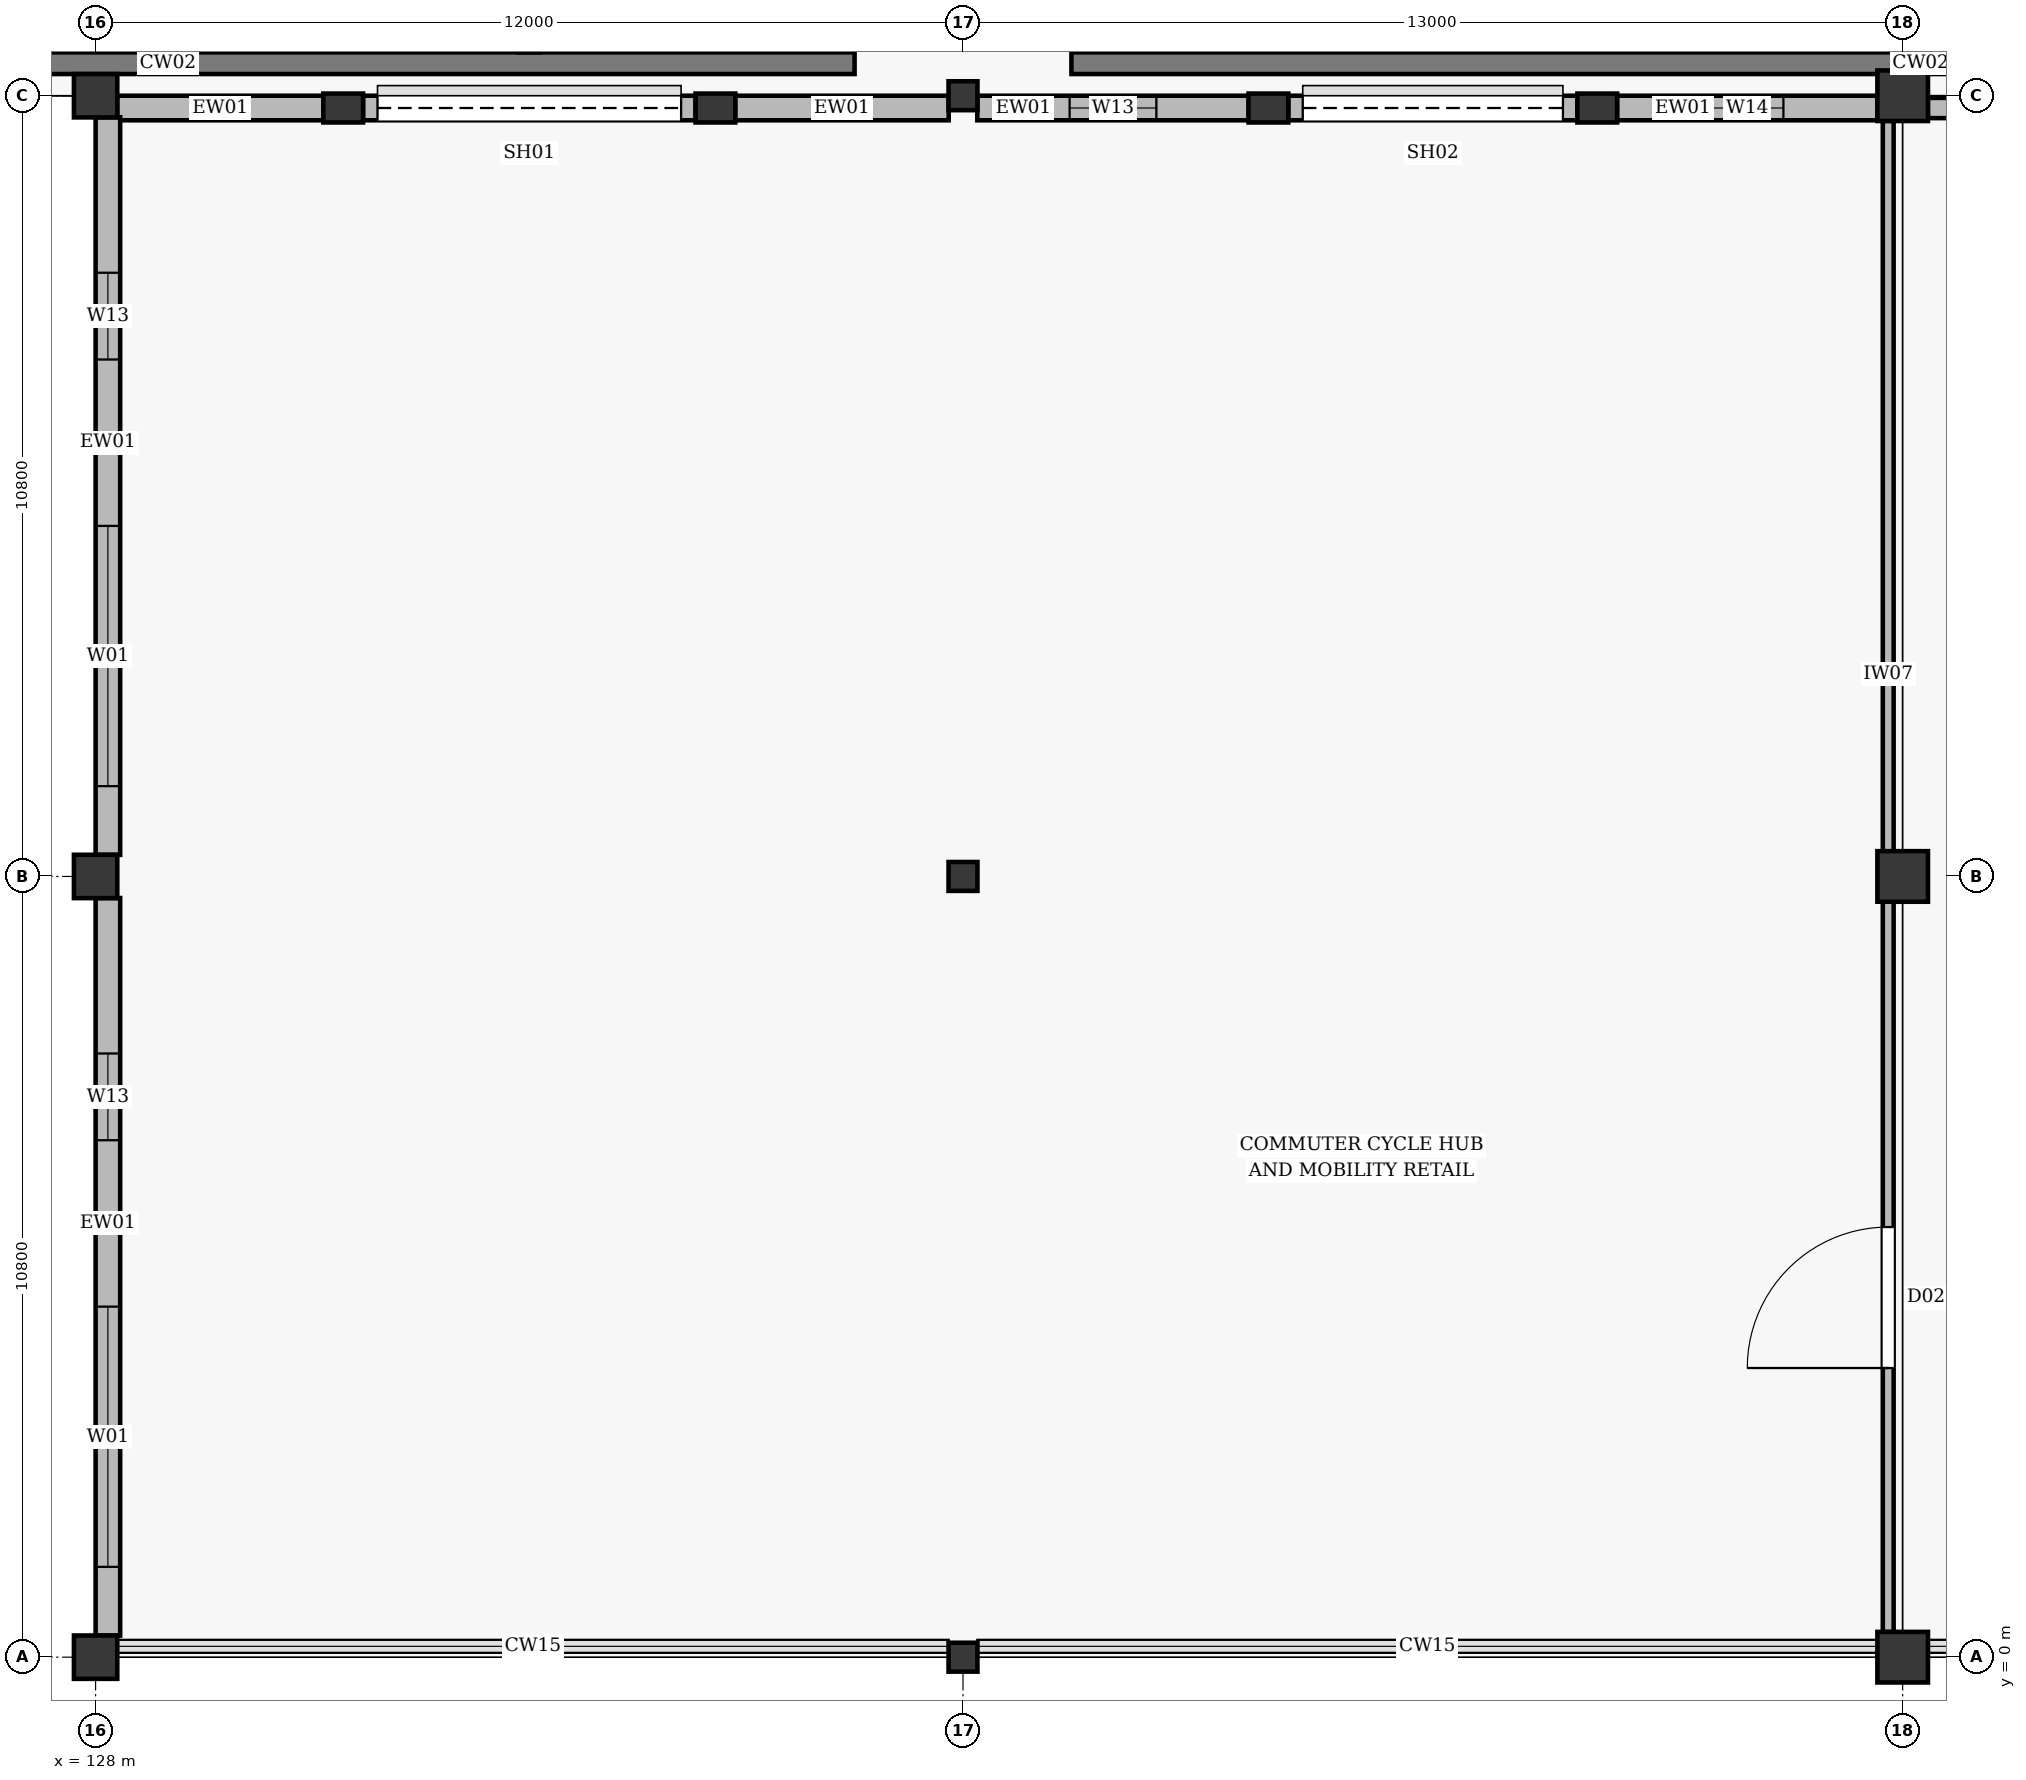
"""IFC4 building model, lengths in metres.
Left out: names, types, materials, properties, quantities, classifications, styles, units other than length and angle.
Written with IfcOpenShell. Run it as: python <this file> out.ifc"""

import sys

from ifc_helpers import new_model, si_unit, direction, frame, frame_2d, origin, origin_2d, place, context, subcontext, project, spatial, rectangle, hollow_rectangle, extrude, element, fill, save


model = new_model("IFC4")
c1 = context("Model", 3, precision=1e-05, world=origin(), true_north=direction((0.0, 1.0)))
c2 = subcontext(c1, "Body", "Model", "MODEL_VIEW")
j1 = project(units=[si_unit("LENGTHUNIT", "METRE"), si_unit("PLANEANGLEUNIT", "RADIAN")], contexts=[c1])
p1 = place(None, origin())
s1 = spatial("IfcSite", under=j1, at=p1, CompositionType="ELEMENT")
p2 = place(p1, origin())
s2 = spatial("IfcBuilding", under=s1, at=p2, CompositionType="ELEMENT")
p3 = place(p2, origin())
s3 = spatial("IfcBuildingStorey", under=s2, at=p3, CompositionType="ELEMENT", Elevation=0.0)
for number, where, z_axis, x_axis in (
    (1, (128.0, 0.0, 0.0), (0.0, 0.0, 1.0), (1.0, 0.0, 0.0)),
    (2, (128.0, 10.8, 0.0), (0.0, 0.0, 1.0), (1.0, 0.0, 0.0)),
    (3, (128.0, 21.6, 0.0), (0.0, 0.0, 1.0), (1.0, 0.0, 0.0)),
):
    element("IfcColumn", number, at=place(p3, frame(where, z_axis=z_axis, x_axis=x_axis)), inside=s3, PredefinedType="COLUMN", context=c2, shape_type="SweptSolid", body=[
        extrude(rectangle(XDim=0.6, YDim=0.6, at=origin_2d()), origin(), (0.0, 0.0, 1.0), 6.6),
    ])
for number, where, z_axis, x_axis in (
    (4, (140.0, 0.0, 0.0), (0.0, 0.0, 1.0), (1.0, 0.0, 0.0)),
    (5, (140.0, 10.8, 0.0), (0.0, 0.0, 1.0), (1.0, 0.0, 0.0)),
    (6, (140.0, 21.6, 0.0), (0.0, 0.0, 1.0), (1.0, 0.0, 0.0)),
):
    element("IfcColumn", number, at=place(p3, frame(where, z_axis=z_axis, x_axis=x_axis)), inside=s3, PredefinedType="COLUMN", context=c2, shape_type="SweptSolid", body=[
        extrude(hollow_rectangle(XDim=0.4, YDim=0.4, WallThickness=0.016, at=origin_2d()), origin(), (0.0, 0.0, 1.0), 6.6),
    ])
for number, where, z_axis, x_axis in (
    (7, (153.0, 0.0, 0.0), (0.0, 0.0, 1.0), (1.0, 0.0, 0.0)),
    (8, (153.0, 10.8, 0.0), (0.0, 0.0, 1.0), (1.0, 0.0, 0.0)),
    (9, (153.0, 21.6, 0.0), (0.0, 0.0, 1.0), (1.0, 0.0, 0.0)),
):
    element("IfcColumn", number, at=place(p3, frame(where, z_axis=z_axis, x_axis=x_axis)), inside=s3, PredefinedType="COLUMN", context=c2, shape_type="SweptSolid", body=[
        extrude(rectangle(XDim=0.7, YDim=0.7, at=origin_2d()), origin(), (0.0, 0.0, 1.0), 6.6),
    ])
p4 = place(p3, frame((119.5, 22.05, 0.0), z_axis=(0.0, 0.0, 1.0), x_axis=(1.0, 0.0, 0.0)))
e10 = element("IfcWall", 10, at=p4, inside=s3, PredefinedType="SOLIDWALL", context=c2, shape_type="SweptSolid", body=[
    extrude(rectangle(XDim=19.0, YDim=0.3, at=frame_2d((9.5, 0.0))), origin(), (0.0, 0.0, 1.0), 0.375),
])
p5 = place(p3, frame((141.5, 22.05, 0.0), z_axis=(0.0, 0.0, 1.0), x_axis=(1.0, 0.0, 0.0)))
e11 = element("IfcWall", 11, at=p5, inside=s3, PredefinedType="SOLIDWALL", context=c2, shape_type="SweptSolid", body=[
    extrude(rectangle(XDim=23.5, YDim=0.3, at=frame_2d((11.75, 0.0))), origin(), (0.0, 0.0, 1.0), 0.375),
])
p6 = place(p3, frame((134.0, 22.2, 0.0), z_axis=(0.0, 0.0, 1.0), x_axis=(0.0, 1.0, 0.0)))
e12 = element("IfcWall", 12, at=p6, inside=s3, PredefinedType="SOLIDWALL", context=c2, shape_type="SweptSolid", body=[
    extrude(rectangle(XDim=4.8, YDim=0.3, at=frame_2d((2.4, 0.0))), origin(), (0.0, 0.0, 1.0), 0.375),
])
for number, where, z_axis, x_axis in (
    (13, (131.425, 21.43, 0.0), (0.0, 0.0, 1.0), (1.0, 0.0, 0.0)),
    (14, (136.575, 21.43, 0.0), (0.0, 0.0, 1.0), (1.0, 0.0, 0.0)),
):
    element("IfcColumn", number, at=place(p3, frame(where, z_axis=z_axis, x_axis=x_axis)), inside=s3, PredefinedType="PILASTER", context=c2, shape_type="SweptSolid", body=[
        extrude(rectangle(XDim=0.55, YDim=0.4, at=origin_2d()), origin(), (0.0, 0.0, 1.0), 4.3),
    ])
p7 = place(p3, frame((128.298, 21.43, 0.0), z_axis=(0.0, 0.0, 1.0), x_axis=(1.0, 0.0, 0.0)))
e15 = element("IfcWall", 15, at=p7, inside=s3, PredefinedType="STANDARD", context=c2, shape_type="SweptSolid", body=[
    extrude(rectangle(XDim=2.854, YDim=0.34, at=frame_2d((1.427, 0.0))), origin(), (0.0, 0.0, 1.0), 4.28),
])
p8 = place(p3, frame((136.848, 21.43, 0.0), z_axis=(0.0, 0.0, 1.0), x_axis=(1.0, 0.0, 0.0)))
e16 = element("IfcWall", 16, at=p8, inside=s3, PredefinedType="STANDARD", context=c2, shape_type="SweptSolid", body=[
    extrude(rectangle(XDim=2.954, YDim=0.34, at=frame_2d((1.477, 0.0))), origin(), (0.0, 0.0, 1.0), 4.28),
])
p9 = place(p3, frame((131.7, 21.43, 0.0), z_axis=(0.0, 0.0, 1.0), x_axis=(1.0, 0.0, 0.0)))
e17 = element("IfcWall", 17, at=p9, inside=s3, PredefinedType="STANDARD", context=c2, shape_type="SweptSolid", body=[
    extrude(rectangle(XDim=4.6, YDim=0.34, at=frame_2d((2.3, 0.0))), origin(), (0.0, 0.0, 1.0), 4.26),
])
p10 = place(p9, frame((0.2, 0.0, 0.005)))
e18 = element("IfcOpeningElement", 18, at=p10, cuts=e17, PredefinedType="OPENING", context=c2, shape_type="SweptSolid", body=[
    extrude(rectangle(XDim=4.2, YDim=3.6, at=frame_2d((2.1, 1.8))), frame((0.0, 0.182, 0.0), z_axis=(0.0, -1.0, 0.0), x_axis=(1.0, 0.0, 0.0)), (0.0, 0.0, 1.0), 0.364),
])
for number, where, z_axis, x_axis in (
    (19, (144.225, 21.43, 0.0), (0.0, 0.0, 1.0), (1.0, 0.0, 0.0)),
    (20, (148.775, 21.43, 0.0), (0.0, 0.0, 1.0), (1.0, 0.0, 0.0)),
):
    element("IfcColumn", number, at=place(p3, frame(where, z_axis=z_axis, x_axis=x_axis)), inside=s3, PredefinedType="PILASTER", context=c2, shape_type="SweptSolid", body=[
        extrude(rectangle(XDim=0.55, YDim=0.4, at=origin_2d()), origin(), (0.0, 0.0, 1.0), 4.3),
    ])
p11 = place(p3, frame((140.198, 21.43, 0.0), z_axis=(0.0, 0.0, 1.0), x_axis=(1.0, 0.0, 0.0)))
e21 = element("IfcWall", 21, at=p11, inside=s3, PredefinedType="STANDARD", context=c2, shape_type="SweptSolid", body=[
    extrude(rectangle(XDim=3.754, YDim=0.34, at=frame_2d((1.877, 0.0))), origin(), (0.0, 0.0, 1.0), 4.28),
])
p12 = place(p11, frame((1.277, 0.0, 1.05)))
e22 = element("IfcOpeningElement", 22, at=p12, cuts=e21, PredefinedType="OPENING", context=c2, shape_type="SweptSolid", body=[
    extrude(rectangle(XDim=1.2, YDim=1.8, at=frame_2d((0.6, 0.9))), frame((0.0, 0.182, 0.0), z_axis=(0.0, -1.0, 0.0), x_axis=(1.0, 0.0, 0.0)), (0.0, 0.0, 1.0), 0.364),
])
p13 = place(p3, frame((149.048, 21.43, 0.0), z_axis=(0.0, 0.0, 1.0), x_axis=(1.0, 0.0, 0.0)))
e23 = element("IfcWall", 23, at=p13, inside=s3, PredefinedType="STANDARD", context=c2, shape_type="SweptSolid", body=[
    extrude(rectangle(XDim=3.604, YDim=0.34, at=frame_2d((1.802, 0.0))), origin(), (0.0, 0.0, 1.0), 4.28),
])
p14 = place(p13, frame((1.302, 0.0, 1.05)))
e24 = element("IfcOpeningElement", 24, at=p14, cuts=e23, PredefinedType="OPENING", context=c2, shape_type="SweptSolid", body=[
    extrude(rectangle(XDim=1.0, YDim=1.6, at=frame_2d((0.5, 0.8))), frame((0.0, 0.182, 0.0), z_axis=(0.0, -1.0, 0.0), x_axis=(1.0, 0.0, 0.0)), (0.0, 0.0, 1.0), 0.364),
])
p15 = place(p3, frame((144.5, 21.43, 0.0), z_axis=(0.0, 0.0, 1.0), x_axis=(1.0, 0.0, 0.0)))
e25 = element("IfcWall", 25, at=p15, inside=s3, PredefinedType="STANDARD", context=c2, shape_type="SweptSolid", body=[
    extrude(rectangle(XDim=4.0, YDim=0.34, at=frame_2d((2.0, 0.0))), origin(), (0.0, 0.0, 1.0), 4.26),
])
p16 = place(p15, frame((0.2, 0.0, 0.005)))
e26 = element("IfcOpeningElement", 26, at=p16, cuts=e25, PredefinedType="OPENING", context=c2, shape_type="SweptSolid", body=[
    extrude(rectangle(XDim=3.6, YDim=3.2, at=frame_2d((1.8, 1.6))), frame((0.0, 0.182, 0.0), z_axis=(0.0, -1.0, 0.0), x_axis=(1.0, 0.0, 0.0)), (0.0, 0.0, 1.0), 0.364),
])
p17 = place(p3, frame((153.348, 21.43, 0.0), z_axis=(0.0, 0.0, 1.0), x_axis=(1.0, 0.0, 0.0)))
e27 = element("IfcWall", 27, at=p17, inside=s3, PredefinedType="STANDARD", context=c2, shape_type="SweptSolid", body=[
    extrude(rectangle(XDim=12.804, YDim=0.28, at=frame_2d((6.402, 0.0))), origin(), (0.0, 0.0, 1.0), 5.69),
])
p18 = place(p17, frame((0.801, 0.0, 0.75)))
e28 = element("IfcOpeningElement", 28, at=p18, cuts=e27, PredefinedType="OPENING", context=c2, shape_type="SweptSolid", body=[
    extrude(rectangle(XDim=3.2, YDim=2.8, at=frame_2d((1.6, 1.4))), frame((0.0, 0.152, 0.0), z_axis=(0.0, -1.0, 0.0), x_axis=(1.0, 0.0, 0.0)), (0.0, 0.0, 1.0), 0.304),
])
p19 = place(p17, frame((5.402, 0.0, 0.75)))
e29 = element("IfcOpeningElement", 29, at=p19, cuts=e27, PredefinedType="OPENING", context=c2, shape_type="SweptSolid", body=[
    extrude(rectangle(XDim=2.0, YDim=2.2, at=frame_2d((1.0, 1.1))), frame((0.0, 0.152, 0.0), z_axis=(0.0, -1.0, 0.0), x_axis=(1.0, 0.0, 0.0)), (0.0, 0.0, 1.0), 0.304),
])
p20 = place(p17, frame((8.803, 0.0, 0.75)))
e30 = element("IfcOpeningElement", 30, at=p20, cuts=e27, PredefinedType="OPENING", context=c2, shape_type="SweptSolid", body=[
    extrude(rectangle(XDim=3.2, YDim=2.8, at=frame_2d((1.6, 1.4))), frame((0.0, 0.152, 0.0), z_axis=(0.0, -1.0, 0.0), x_axis=(1.0, 0.0, 0.0)), (0.0, 0.0, 1.0), 0.304),
])
p21 = place(p3, frame((128.17, 0.298, 0.0), z_axis=(0.0, 0.0, 1.0), x_axis=(0.0, 1.0, 0.0)))
e31 = element("IfcWall", 31, at=p21, inside=s3, PredefinedType="STANDARD", context=c2, shape_type="SweptSolid", body=[
    extrude(rectangle(XDim=10.204, YDim=0.34, at=frame_2d((5.102, 0.0))), origin(), (0.0, 0.0, 1.0), 5.75),
])
p22 = place(p21, frame((0.951, 0.0, 0.75)))
e32 = element("IfcOpeningElement", 32, at=p22, cuts=e31, PredefinedType="OPENING", context=c2, shape_type="SweptSolid", body=[
    extrude(rectangle(XDim=3.6, YDim=2.8, at=frame_2d((1.8, 1.4))), frame((0.0, 0.182, 0.0), z_axis=(0.0, -1.0, 0.0), x_axis=(1.0, 0.0, 0.0)), (0.0, 0.0, 1.0), 0.364),
])
p23 = place(p21, frame((6.853, 0.0, 1.05)))
e33 = element("IfcOpeningElement", 33, at=p23, cuts=e31, PredefinedType="OPENING", context=c2, shape_type="SweptSolid", body=[
    extrude(rectangle(XDim=1.2, YDim=1.8, at=frame_2d((0.6, 0.9))), frame((0.0, 0.182, 0.0), z_axis=(0.0, -1.0, 0.0), x_axis=(1.0, 0.0, 0.0)), (0.0, 0.0, 1.0), 0.364),
])
p24 = place(p3, frame((128.17, 11.098, 0.0), z_axis=(0.0, 0.0, 1.0), x_axis=(0.0, 1.0, 0.0)))
e34 = element("IfcWall", 34, at=p24, inside=s3, PredefinedType="STANDARD", context=c2, shape_type="SweptSolid", body=[
    extrude(rectangle(XDim=10.204, YDim=0.34, at=frame_2d((5.102, 0.0))), origin(), (0.0, 0.0, 1.0), 5.69),
])
p25 = place(p24, frame((0.951, 0.0, 0.75)))
e35 = element("IfcOpeningElement", 35, at=p25, cuts=e34, PredefinedType="OPENING", context=c2, shape_type="SweptSolid", body=[
    extrude(rectangle(XDim=3.6, YDim=2.8, at=frame_2d((1.8, 1.4))), frame((0.0, 0.182, 0.0), z_axis=(0.0, -1.0, 0.0), x_axis=(1.0, 0.0, 0.0)), (0.0, 0.0, 1.0), 0.364),
])
p26 = place(p24, frame((6.853, 0.0, 1.05)))
e36 = element("IfcOpeningElement", 36, at=p26, cuts=e34, PredefinedType="OPENING", context=c2, shape_type="SweptSolid", body=[
    extrude(rectangle(XDim=1.2, YDim=1.8, at=frame_2d((0.6, 0.9))), frame((0.0, 0.182, 0.0), z_axis=(0.0, -1.0, 0.0), x_axis=(1.0, 0.0, 0.0)), (0.0, 0.0, 1.0), 0.364),
])
p27 = place(p3, frame((152.8, 0.348, 0.0), z_axis=(0.0, 0.0, 1.0), x_axis=(0.0, 1.0, 0.0)))
e37 = element("IfcWall", 37, at=p27, inside=s3, PredefinedType="PARTITIONING", context=c2, shape_type="SweptSolid", body=[
    extrude(rectangle(XDim=20.904, YDim=0.15, at=frame_2d((10.452, 0.0))), origin(), (0.0, 0.0, 1.0), 5.69),
])
p28 = place(p27, frame((3.652, 0.0, 0.005)))
e38 = element("IfcOpeningElement", 38, at=p28, cuts=e37, PredefinedType="OPENING", context=c2, shape_type="SweptSolid", body=[
    extrude(rectangle(XDim=1.95, YDim=2.3, at=frame_2d((0.975, 1.15))), frame((0.0, 0.087, 0.0), z_axis=(0.0, -1.0, 0.0), x_axis=(1.0, 0.0, 0.0)), (0.0, 0.0, 1.0), 0.174),
])
p29 = place(p10, origin())
e39 = element("IfcDoor", 39, at=p29, inside=s3, OperationType="ROLLINGUP", PredefinedType="GATE", context=c2, shape_type="SweptSolid", body=[
    extrude(rectangle(XDim=4.2, YDim=3.6, at=frame_2d((2.1, 1.8))), frame((0.0, 0.025, 0.0), z_axis=(0.0, -1.0, 0.0), x_axis=(1.0, 0.0, 0.0)), (0.0, 0.0, 1.0), 0.05),
])
fill(e18, e39)
p30 = place(p12, origin())
e40 = element("IfcWindow", 40, at=p30, inside=s3, PartitioningType="DOUBLE_PANEL_VERTICAL", PredefinedType="WINDOW", context=c2, shape_type="SweptSolid", body=[
    extrude(rectangle(XDim=1.2, YDim=1.8, at=frame_2d((0.6, 0.9))), frame((0.0, 0.03, 0.0), z_axis=(0.0, -1.0, 0.0), x_axis=(1.0, 0.0, 0.0)), (0.0, 0.0, 1.0), 0.06),
])
fill(e22, e40)
p31 = place(p14, origin())
e41 = element("IfcWindow", 41, at=p31, inside=s3, PartitioningType="DOUBLE_PANEL_VERTICAL", PredefinedType="WINDOW", context=c2, shape_type="SweptSolid", body=[
    extrude(rectangle(XDim=1.0, YDim=1.6, at=frame_2d((0.5, 0.8))), frame((0.0, 0.03, 0.0), z_axis=(0.0, -1.0, 0.0), x_axis=(1.0, 0.0, 0.0)), (0.0, 0.0, 1.0), 0.06),
])
fill(e24, e41)
p32 = place(p16, origin())
e42 = element("IfcDoor", 42, at=p32, inside=s3, OperationType="ROLLINGUP", PredefinedType="GATE", context=c2, shape_type="SweptSolid", body=[
    extrude(rectangle(XDim=3.6, YDim=3.2, at=frame_2d((1.8, 1.6))), frame((0.0, 0.025, 0.0), z_axis=(0.0, -1.0, 0.0), x_axis=(1.0, 0.0, 0.0)), (0.0, 0.0, 1.0), 0.05),
])
fill(e26, e42)
p33 = place(p22, origin())
e43 = element("IfcWindow", 43, at=p33, inside=s3, PartitioningType="DOUBLE_PANEL_VERTICAL", PredefinedType="WINDOW", context=c2, shape_type="SweptSolid", body=[
    extrude(rectangle(XDim=3.6, YDim=2.8, at=frame_2d((1.8, 1.4))), frame((0.0, 0.03, 0.0), z_axis=(0.0, -1.0, 0.0), x_axis=(1.0, 0.0, 0.0)), (0.0, 0.0, 1.0), 0.06),
])
fill(e32, e43)
p34 = place(p23, origin())
e44 = element("IfcWindow", 44, at=p34, inside=s3, PartitioningType="DOUBLE_PANEL_VERTICAL", PredefinedType="WINDOW", context=c2, shape_type="SweptSolid", body=[
    extrude(rectangle(XDim=1.2, YDim=1.8, at=frame_2d((0.6, 0.9))), frame((0.0, 0.03, 0.0), z_axis=(0.0, -1.0, 0.0), x_axis=(1.0, 0.0, 0.0)), (0.0, 0.0, 1.0), 0.06),
])
fill(e33, e44)
p35 = place(p25, origin())
e45 = element("IfcWindow", 45, at=p35, inside=s3, PartitioningType="DOUBLE_PANEL_VERTICAL", PredefinedType="WINDOW", context=c2, shape_type="SweptSolid", body=[
    extrude(rectangle(XDim=3.6, YDim=2.8, at=frame_2d((1.8, 1.4))), frame((0.0, 0.03, 0.0), z_axis=(0.0, -1.0, 0.0), x_axis=(1.0, 0.0, 0.0)), (0.0, 0.0, 1.0), 0.06),
])
fill(e35, e45)
p36 = place(p26, origin())
e46 = element("IfcWindow", 46, at=p36, inside=s3, PartitioningType="DOUBLE_PANEL_VERTICAL", PredefinedType="WINDOW", context=c2, shape_type="SweptSolid", body=[
    extrude(rectangle(XDim=1.2, YDim=1.8, at=frame_2d((0.6, 0.9))), frame((0.0, 0.03, 0.0), z_axis=(0.0, -1.0, 0.0), x_axis=(1.0, 0.0, 0.0)), (0.0, 0.0, 1.0), 0.06),
])
fill(e36, e46)
p37 = place(p28, origin())
e47 = element("IfcDoor", 47, at=p37, inside=s3, OperationType="DOUBLE_DOOR_SINGLE_SWING", PredefinedType="DOOR", context=c2, shape_type="SweptSolid", body=[
    extrude(rectangle(XDim=1.95, YDim=2.3, at=frame_2d((0.975, 1.15))), frame((0.0, 0.025, 0.0), z_axis=(0.0, -1.0, 0.0), x_axis=(1.0, 0.0, 0.0)), (0.0, 0.0, 1.0), 0.05),
])
fill(e38, e47)
save(model, sys.argv[1])
